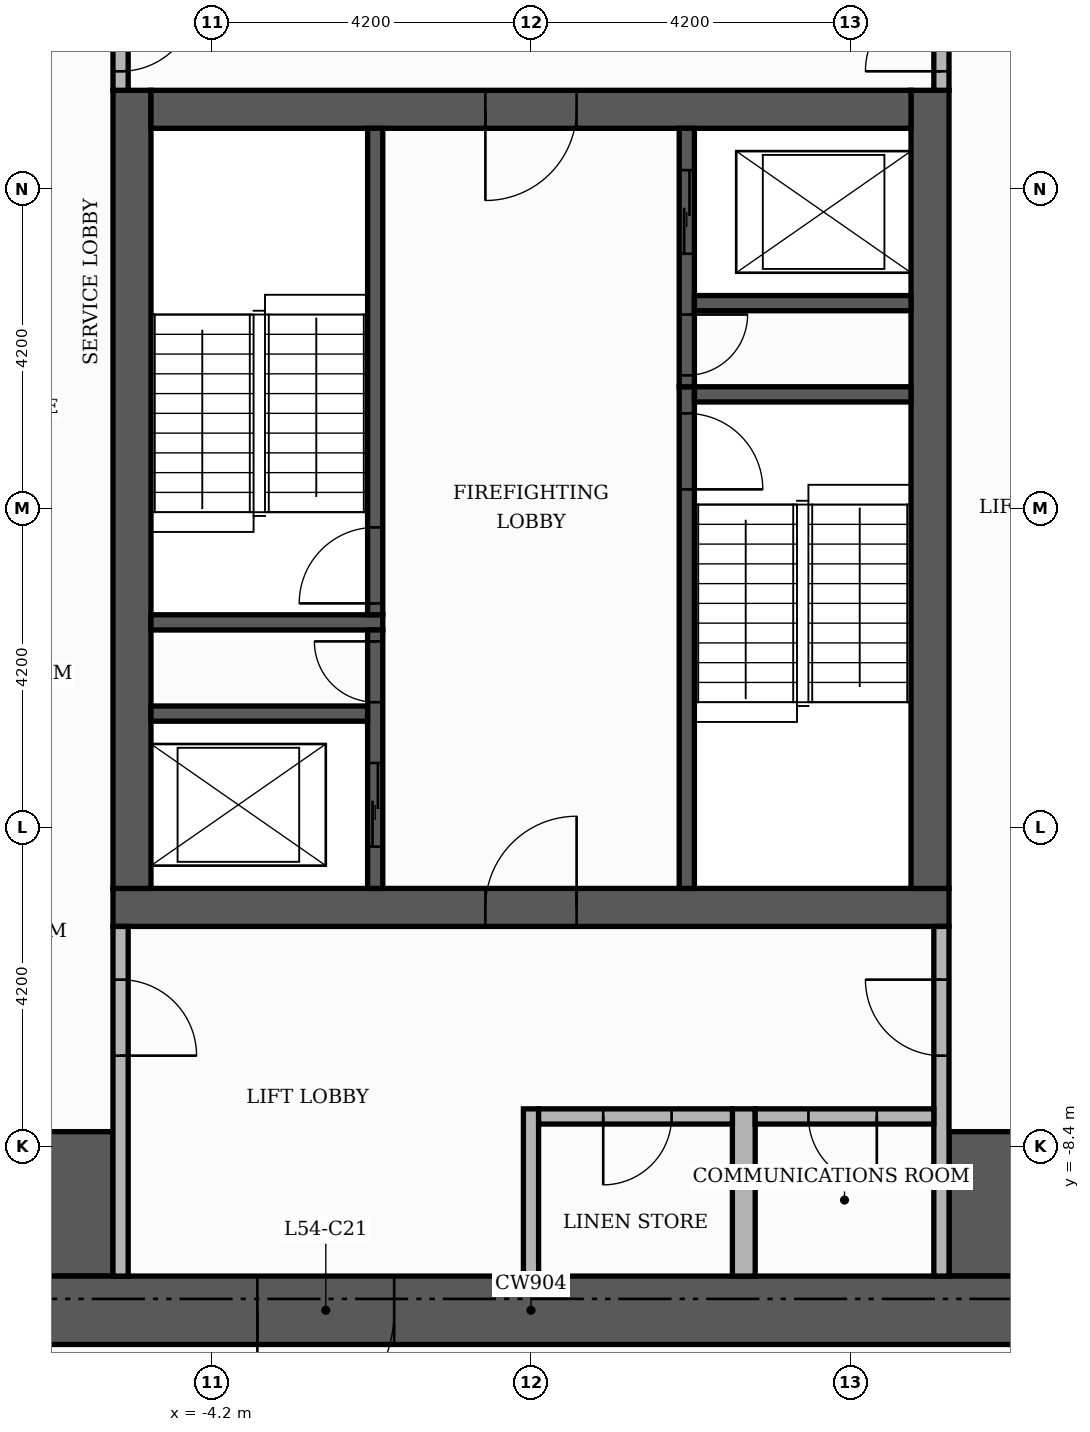
"""IFC4 building model, lengths in metres.
Left out: names, types, materials, properties, quantities, classifications, styles, units other than length and angle.
Written with IfcOpenShell. Run it as: python <this file> out.ifc"""

import sys

from ifc_helpers import new_model, si_unit, direction, frame, frame_2d, origin, place, context, subcontext, project, spatial, rectangle, extrude, element, fill, save


model = new_model("IFC4")
c1 = context("Model", 3, precision=1e-05, world=origin(), true_north=direction((0.0, 1.0)))
c2 = subcontext(c1, "Body", "Model", "MODEL_VIEW")
j1 = project(units=[si_unit("LENGTHUNIT", "METRE"), si_unit("PLANEANGLEUNIT", "RADIAN")], contexts=[c1])
p1 = place(None, origin())
s1 = spatial("IfcSite", under=j1, at=p1, CompositionType="ELEMENT")
p2 = place(p1, origin())
s2 = spatial("IfcBuilding", under=s1, at=p2, CompositionType="ELEMENT")
p3 = place(p2, frame((0.0, 0.0, 227.4)))
s3 = spatial("IfcBuildingStorey", under=s2, at=p3, CompositionType="ELEMENT", Elevation=227.4)
p4 = place(p3, frame((-5.5, -5.25, 0.0), z_axis=(0.0, 0.0, 1.0), x_axis=(1.0, 0.0, 0.0)))
e1 = element("IfcWall", 1, at=p4, inside=s3, PredefinedType="SHEAR", context=c2, shape_type="SweptSolid", body=[
    extrude(rectangle(XDim=11.0, YDim=0.5, at=frame_2d((5.5, 0.0))), origin(), (0.0, 0.0, 1.0), 3.48),
])
p5 = place(p4, frame((4.9, 0.0, 0.0)))
e2 = element("IfcOpeningElement", 2, at=p5, cuts=e1, PredefinedType="OPENING", context=c2, shape_type="SweptSolid", body=[
    extrude(rectangle(XDim=1.2, YDim=2.1, at=frame_2d((0.6, 1.05))), frame((0.0, 0.26, 0.0), z_axis=(0.0, -1.0, 0.0), x_axis=(1.0, 0.0, 0.0)), (0.0, 0.0, 1.0), 0.52),
])
for number, where, z_axis, x_axis in (
    (3, (-5.25, -5.0, 0.0), (0.0, 0.0, 1.0), (0.0, 1.0, 0.0)),
    (4, (5.25, -5.0, 0.0), (0.0, 0.0, 1.0), (0.0, 1.0, 0.0)),
):
    element("IfcWall", number, at=place(p3, frame(where, z_axis=z_axis, x_axis=x_axis)), inside=s3, PredefinedType="SHEAR", context=c2, shape_type="SweptSolid", body=[
        extrude(rectangle(XDim=10.5, YDim=0.5, at=frame_2d((5.25, 0.0))), origin(), (0.0, 0.0, 1.0), 3.48),
    ])
p6 = place(p3, frame((-5.0, 5.25, 0.0), z_axis=(0.0, 0.0, 1.0), x_axis=(1.0, 0.0, 0.0)))
e5 = element("IfcWall", 5, at=p6, inside=s3, PredefinedType="SHEAR", context=c2, shape_type="SweptSolid", body=[
    extrude(rectangle(XDim=10.0, YDim=0.5, at=frame_2d((5.0, 0.0))), origin(), (0.0, 0.0, 1.0), 3.48),
])
p7 = place(p6, frame((4.4, 0.0, 0.0)))
e6 = element("IfcOpeningElement", 6, at=p7, cuts=e5, PredefinedType="OPENING", context=c2, shape_type="SweptSolid", body=[
    extrude(rectangle(XDim=1.2, YDim=2.1, at=frame_2d((0.6, 1.05))), frame((0.0, 0.26, 0.0), z_axis=(0.0, -1.0, 0.0), x_axis=(1.0, 0.0, 0.0)), (0.0, 0.0, 1.0), 0.52),
])
for number, where, z_axis, x_axis in (
    (7, (-10.1, -9.15, 0.0), (0.0, 0.0, 1.0), (1.0, 0.0, 0.0)),
    (8, (5.5, -9.15, 0.0), (0.0, 0.0, 1.0), (1.0, 0.0, 0.0)),
):
    element("IfcWall", number, at=place(p3, frame(where, z_axis=z_axis, x_axis=x_axis)), inside=s3, PredefinedType="SHEAR", context=c2, shape_type="SweptSolid", body=[
        extrude(rectangle(XDim=4.6, YDim=1.9, at=frame_2d((2.3, 0.0))), origin(), (0.0, 0.0, 1.0), 3.48),
    ])
p8 = place(p3, frame((2.05, -5.0, 0.0), z_axis=(0.0, 0.0, 1.0), x_axis=(0.0, 1.0, 0.0)))
e9 = element("IfcWall", 9, at=p8, inside=s3, PredefinedType="SHEAR", context=c2, shape_type="SweptSolid", body=[
    extrude(rectangle(XDim=6.6, YDim=0.2, at=frame_2d((3.3, 0.0))), origin(), (0.0, 0.0, 1.0), 3.48),
])
p9 = place(p8, frame((5.25, 0.0, 0.0)))
e10 = element("IfcOpeningElement", 10, at=p9, cuts=e9, PredefinedType="OPENING", context=c2, shape_type="SweptSolid", body=[
    extrude(rectangle(XDim=1.0, YDim=2.1, at=frame_2d((0.5, 1.05))), frame((0.0, 0.11, 0.0), z_axis=(0.0, -1.0, 0.0), x_axis=(1.0, 0.0, 0.0)), (0.0, 0.0, 1.0), 0.22),
])
p10 = place(p3, frame((-5.0, -1.5, 0.0), z_axis=(0.0, 0.0, 1.0), x_axis=(1.0, 0.0, 0.0)))
e11 = element("IfcWall", 11, at=p10, inside=s3, PredefinedType="SHEAR", context=c2, shape_type="SweptSolid", body=[
    extrude(rectangle(XDim=3.05, YDim=0.2, at=frame_2d((1.525, 0.0))), origin(), (0.0, 0.0, 1.0), 3.48),
])
p11 = place(p3, frame((-2.05, -1.4, 0.0), z_axis=(0.0, 0.0, 1.0), x_axis=(0.0, 1.0, 0.0)))
e12 = element("IfcWall", 12, at=p11, inside=s3, PredefinedType="SHEAR", context=c2, shape_type="SweptSolid", body=[
    extrude(rectangle(XDim=6.4, YDim=0.2, at=frame_2d((3.2, 0.0))), origin(), (0.0, 0.0, 1.0), 3.48),
])
p12 = place(p11, frame((0.15, 0.0, 0.0)))
e13 = element("IfcOpeningElement", 13, at=p12, cuts=e12, PredefinedType="OPENING", context=c2, shape_type="SweptSolid", body=[
    extrude(rectangle(XDim=1.0, YDim=2.1, at=frame_2d((0.5, 1.05))), frame((0.0, 0.11, 0.0), z_axis=(0.0, -1.0, 0.0), x_axis=(1.0, 0.0, 0.0)), (0.0, 0.0, 1.0), 0.22),
])
p13 = place(p3, frame((2.15, 1.5, 0.0), z_axis=(0.0, 0.0, 1.0), x_axis=(1.0, 0.0, 0.0)))
e14 = element("IfcWall", 14, at=p13, inside=s3, PredefinedType="SHEAR", context=c2, shape_type="SweptSolid", body=[
    extrude(rectangle(XDim=2.85, YDim=0.2, at=frame_2d((1.425, 0.0))), origin(), (0.0, 0.0, 1.0), 3.48),
])
p14 = place(p3, frame((-2.05, -5.0, 0.0), z_axis=(0.0, 0.0, 1.0), x_axis=(0.0, 1.0, 0.0)))
e15 = element("IfcWall", 15, at=p14, inside=s3, PredefinedType="SHEAR", context=c2, shape_type="SweptSolid", body=[
    extrude(rectangle(XDim=3.4, YDim=0.2, at=frame_2d((1.7, 0.0))), origin(), (0.0, 0.0, 1.0), 3.48),
])
p15 = place(p14, frame((0.55, 0.0, 0.0)))
e16 = element("IfcOpeningElement", 16, at=p15, cuts=e15, PredefinedType="OPENING", context=c2, shape_type="SweptSolid", body=[
    extrude(rectangle(XDim=1.1, YDim=2.1, at=frame_2d((0.55, 1.05))), frame((0.0, 0.11, 0.0), z_axis=(0.0, -1.0, 0.0), x_axis=(1.0, 0.0, 0.0)), (0.0, 0.0, 1.0), 0.22),
])
p16 = place(p14, frame((2.45, 0.0, 0.0)))
e17 = element("IfcOpeningElement", 17, at=p16, cuts=e15, PredefinedType="OPENING", context=c2, shape_type="SweptSolid", body=[
    extrude(rectangle(XDim=0.8, YDim=2.1, at=frame_2d((0.4, 1.05))), frame((0.0, 0.11, 0.0), z_axis=(0.0, -1.0, 0.0), x_axis=(1.0, 0.0, 0.0)), (0.0, 0.0, 1.0), 0.22),
])
p17 = place(p3, frame((-5.0, -2.7, 0.0), z_axis=(0.0, 0.0, 1.0), x_axis=(1.0, 0.0, 0.0)))
e18 = element("IfcWall", 18, at=p17, inside=s3, PredefinedType="SHEAR", context=c2, shape_type="SweptSolid", body=[
    extrude(rectangle(XDim=2.85, YDim=0.2, at=frame_2d((1.425, 0.0))), origin(), (0.0, 0.0, 1.0), 3.48),
])
p18 = place(p3, frame((2.05, 1.6, 0.0), z_axis=(0.0, 0.0, 1.0), x_axis=(0.0, 1.0, 0.0)))
e19 = element("IfcWall", 19, at=p18, inside=s3, PredefinedType="SHEAR", context=c2, shape_type="SweptSolid", body=[
    extrude(rectangle(XDim=3.4, YDim=0.2, at=frame_2d((1.7, 0.0))), origin(), (0.0, 0.0, 1.0), 3.48),
])
p19 = place(p18, frame((1.75, 0.0, 0.0)))
e20 = element("IfcOpeningElement", 20, at=p19, cuts=e19, PredefinedType="OPENING", context=c2, shape_type="SweptSolid", body=[
    extrude(rectangle(XDim=1.1, YDim=2.1, at=frame_2d((0.55, 1.05))), frame((0.0, 0.11, 0.0), z_axis=(0.0, -1.0, 0.0), x_axis=(1.0, 0.0, 0.0)), (0.0, 0.0, 1.0), 0.22),
])
p20 = place(p18, frame((0.15, 0.0, 0.0)))
e21 = element("IfcOpeningElement", 21, at=p20, cuts=e19, PredefinedType="OPENING", context=c2, shape_type="SweptSolid", body=[
    extrude(rectangle(XDim=0.8, YDim=2.1, at=frame_2d((0.4, 1.05))), frame((0.0, 0.11, 0.0), z_axis=(0.0, -1.0, 0.0), x_axis=(1.0, 0.0, 0.0)), (0.0, 0.0, 1.0), 0.22),
])
p21 = place(p3, frame((2.15, 2.7, 0.0), z_axis=(0.0, 0.0, 1.0), x_axis=(1.0, 0.0, 0.0)))
e22 = element("IfcWall", 22, at=p21, inside=s3, PredefinedType="SHEAR", context=c2, shape_type="SweptSolid", body=[
    extrude(rectangle(XDim=2.85, YDim=0.2, at=frame_2d((1.425, 0.0))), origin(), (0.0, 0.0, 1.0), 3.48),
])
p22 = place(p3, frame((-11.0, -10.55, 0.0), z_axis=(0.0, 0.0, 1.0), x_axis=(1.0, 0.0, 0.0)))
e23 = element("IfcWall", 23, at=p22, inside=s3, PredefinedType="SHEAR", context=c2, shape_type="SweptSolid", body=[
    extrude(rectangle(XDim=22.0, YDim=0.9, at=frame_2d((11.0, 0.0))), origin(), (0.0, 0.0, 1.0), 3.48),
])
p23 = place(p22, frame((7.4, 0.0, 0.0)))
e24 = element("IfcOpeningElement", 24, at=p23, cuts=e23, PredefinedType="OPENING", context=c2, shape_type="SweptSolid", body=[
    extrude(rectangle(XDim=1.8, YDim=2.2, at=frame_2d((0.9, 1.1))), frame((0.0, 0.46, 0.0), z_axis=(0.0, -1.0, 0.0), x_axis=(1.0, 0.0, 0.0)), (0.0, 0.0, 1.0), 0.92),
])
p24 = place(p3, frame((-5.4, -10.1, 0.0), z_axis=(0.0, 0.0, 1.0), x_axis=(0.0, 1.0, 0.0)))
e25 = element("IfcWall", 25, at=p24, inside=s3, PredefinedType="PARTITIONING", context=c2, shape_type="SweptSolid", body=[
    extrude(rectangle(XDim=4.6, YDim=0.2, at=frame_2d((2.3, 0.0))), origin(), (0.0, 0.0, 1.0), 3.48),
])
p25 = place(p24, frame((2.9, 0.0, 0.0)))
e26 = element("IfcOpeningElement", 26, at=p25, cuts=e25, PredefinedType="OPENING", context=c2, shape_type="SweptSolid", body=[
    extrude(rectangle(XDim=1.0, YDim=2.1, at=frame_2d((0.5, 1.05))), frame((0.0, 0.11, 0.0), z_axis=(0.0, -1.0, 0.0), x_axis=(1.0, 0.0, 0.0)), (0.0, 0.0, 1.0), 0.22),
])
p26 = place(p3, frame((0.0, -10.1, 0.0), z_axis=(0.0, 0.0, 1.0), x_axis=(0.0, 1.0, 0.0)))
e27 = element("IfcWall", 27, at=p26, inside=s3, PredefinedType="PARTITIONING", context=c2, shape_type="SweptSolid", body=[
    extrude(rectangle(XDim=2.2, YDim=0.2, at=frame_2d((1.1, 0.0))), origin(), (0.0, 0.0, 1.0), 3.48),
])
p27 = place(p3, frame((2.8, -10.1, 0.0), z_axis=(0.0, 0.0, 1.0), x_axis=(0.0, 1.0, 0.0)))
e28 = element("IfcWall", 28, at=p27, inside=s3, PredefinedType="PARTITIONING", context=c2, shape_type="SweptSolid", body=[
    extrude(rectangle(XDim=2.2, YDim=0.3, at=frame_2d((1.1, 0.0))), origin(), (0.0, 0.0, 1.0), 3.48),
])
p28 = place(p3, frame((5.4, -10.1, 0.0), z_axis=(0.0, 0.0, 1.0), x_axis=(0.0, 1.0, 0.0)))
e29 = element("IfcWall", 29, at=p28, inside=s3, PredefinedType="PARTITIONING", context=c2, shape_type="SweptSolid", body=[
    extrude(rectangle(XDim=4.6, YDim=0.2, at=frame_2d((2.3, 0.0))), origin(), (0.0, 0.0, 1.0), 3.48),
])
p29 = place(p28, frame((2.9, 0.0, 0.0)))
e30 = element("IfcOpeningElement", 30, at=p29, cuts=e29, PredefinedType="OPENING", context=c2, shape_type="SweptSolid", body=[
    extrude(rectangle(XDim=1.0, YDim=2.1, at=frame_2d((0.5, 1.05))), frame((0.0, 0.11, 0.0), z_axis=(0.0, -1.0, 0.0), x_axis=(1.0, 0.0, 0.0)), (0.0, 0.0, 1.0), 0.22),
])
p30 = place(p3, frame((0.1, -8.0, 0.0), z_axis=(0.0, 0.0, 1.0), x_axis=(1.0, 0.0, 0.0)))
e31 = element("IfcWall", 31, at=p30, inside=s3, PredefinedType="PARTITIONING", context=c2, shape_type="SweptSolid", body=[
    extrude(rectangle(XDim=2.55, YDim=0.2, at=frame_2d((1.275, 0.0))), origin(), (0.0, 0.0, 1.0), 3.48),
])
p31 = place(p30, frame((0.85, 0.0, 0.0)))
e32 = element("IfcOpeningElement", 32, at=p31, cuts=e31, PredefinedType="OPENING", context=c2, shape_type="SweptSolid", body=[
    extrude(rectangle(XDim=0.9, YDim=2.1, at=frame_2d((0.45, 1.05))), frame((0.0, 0.11, 0.0), z_axis=(0.0, -1.0, 0.0), x_axis=(1.0, 0.0, 0.0)), (0.0, 0.0, 1.0), 0.22),
])
p32 = place(p3, frame((2.95, -8.0, 0.0), z_axis=(0.0, 0.0, 1.0), x_axis=(1.0, 0.0, 0.0)))
e33 = element("IfcWall", 33, at=p32, inside=s3, PredefinedType="PARTITIONING", context=c2, shape_type="SweptSolid", body=[
    extrude(rectangle(XDim=2.35, YDim=0.2, at=frame_2d((1.175, 0.0))), origin(), (0.0, 0.0, 1.0), 3.48),
])
p33 = place(p32, frame((0.7, 0.0, 0.0)))
e34 = element("IfcOpeningElement", 34, at=p33, cuts=e33, PredefinedType="OPENING", context=c2, shape_type="SweptSolid", body=[
    extrude(rectangle(XDim=0.9, YDim=2.1, at=frame_2d((0.45, 1.05))), frame((0.0, 0.11, 0.0), z_axis=(0.0, -1.0, 0.0), x_axis=(1.0, 0.0, 0.0)), (0.0, 0.0, 1.0), 0.22),
])
p34 = place(p3, frame((-5.4, 5.5, 0.0), z_axis=(0.0, 0.0, 1.0), x_axis=(0.0, 1.0, 0.0)))
e35 = element("IfcWall", 35, at=p34, inside=s3, PredefinedType="PARTITIONING", context=c2, shape_type="SweptSolid", body=[
    extrude(rectangle(XDim=1.55, YDim=0.2, at=frame_2d((0.775, 0.0))), origin(), (0.0, 0.0, 1.0), 3.48),
])
p35 = place(p34, frame((0.25, 0.0, 0.0)))
e36 = element("IfcOpeningElement", 36, at=p35, cuts=e35, PredefinedType="OPENING", context=c2, shape_type="SweptSolid", body=[
    extrude(rectangle(XDim=1.0, YDim=2.1, at=frame_2d((0.5, 1.05))), frame((0.0, 0.11, 0.0), z_axis=(0.0, -1.0, 0.0), x_axis=(1.0, 0.0, 0.0)), (0.0, 0.0, 1.0), 0.22),
])
p36 = place(p3, frame((5.4, 5.5, 0.0), z_axis=(0.0, 0.0, 1.0), x_axis=(0.0, 1.0, 0.0)))
e37 = element("IfcWall", 37, at=p36, inside=s3, PredefinedType="PARTITIONING", context=c2, shape_type="SweptSolid", body=[
    extrude(rectangle(XDim=4.6, YDim=0.2, at=frame_2d((2.3, 0.0))), origin(), (0.0, 0.0, 1.0), 3.48),
])
p37 = place(p36, frame((0.25, 0.0, 0.0)))
e38 = element("IfcOpeningElement", 38, at=p37, cuts=e37, PredefinedType="OPENING", context=c2, shape_type="SweptSolid", body=[
    extrude(rectangle(XDim=1.0, YDim=2.1, at=frame_2d((0.5, 1.05))), frame((0.0, 0.11, 0.0), z_axis=(0.0, -1.0, 0.0), x_axis=(1.0, 0.0, 0.0)), (0.0, 0.0, 1.0), 0.22),
])
p38 = place(p19, origin())
e39 = element("IfcDoor", 39, at=p38, inside=s3, OperationType="SLIDING_TO_LEFT", PredefinedType="DOOR", context=c2, shape_type="SweptSolid", body=[
    extrude(rectangle(XDim=1.1, YDim=2.1, at=frame_2d((0.55, 1.05))), frame((0.0, 0.025, 0.0), z_axis=(0.0, -1.0, 0.0), x_axis=(1.0, 0.0, 0.0)), (0.0, 0.0, 1.0), 0.05),
])
fill(e20, e39)
p39 = place(p15, origin())
e40 = element("IfcDoor", 40, at=p39, inside=s3, OperationType="SLIDING_TO_LEFT", PredefinedType="DOOR", context=c2, shape_type="SweptSolid", body=[
    extrude(rectangle(XDim=1.1, YDim=2.1, at=frame_2d((0.55, 1.05))), frame((0.0, 0.025, 0.0), z_axis=(0.0, -1.0, 0.0), x_axis=(1.0, 0.0, 0.0)), (0.0, 0.0, 1.0), 0.05),
])
fill(e16, e40)
p40 = place(p12, origin())
e41 = element("IfcDoor", 41, at=p40, inside=s3, OperationType="SINGLE_SWING_LEFT", PredefinedType="DOOR", context=c2, shape_type="SweptSolid", body=[
    extrude(rectangle(XDim=1.0, YDim=2.1, at=frame_2d((0.5, 1.05))), frame((0.0, 0.025, 0.0), z_axis=(0.0, -1.0, 0.0), x_axis=(1.0, 0.0, 0.0)), (0.0, 0.0, 1.0), 0.05),
])
fill(e13, e41)
p41 = place(p9, frame((1.0, 0.0, 0.0), z_axis=(0.0, 0.0, 1.0), x_axis=(-1.0, 0.0, 0.0)))
e42 = element("IfcDoor", 42, at=p41, inside=s3, OperationType="SINGLE_SWING_LEFT", PredefinedType="DOOR", context=c2, shape_type="SweptSolid", body=[
    extrude(rectangle(XDim=1.0, YDim=2.1, at=frame_2d((0.5, 1.05))), frame((0.0, 0.025, 0.0), z_axis=(0.0, -1.0, 0.0), x_axis=(1.0, 0.0, 0.0)), (0.0, 0.0, 1.0), 0.05),
])
fill(e10, e42)
p42 = place(p20, frame((0.8, 0.0, 0.0), z_axis=(0.0, 0.0, 1.0), x_axis=(-1.0, 0.0, 0.0)))
e43 = element("IfcDoor", 43, at=p42, inside=s3, OperationType="SINGLE_SWING_RIGHT", PredefinedType="DOOR", context=c2, shape_type="SweptSolid", body=[
    extrude(rectangle(XDim=0.8, YDim=2.1, at=frame_2d((0.4, 1.05))), frame((0.0, 0.025, 0.0), z_axis=(0.0, -1.0, 0.0), x_axis=(1.0, 0.0, 0.0)), (0.0, 0.0, 1.0), 0.05),
])
fill(e21, e43)
p43 = place(p16, origin())
e44 = element("IfcDoor", 44, at=p43, inside=s3, OperationType="SINGLE_SWING_RIGHT", PredefinedType="DOOR", context=c2, shape_type="SweptSolid", body=[
    extrude(rectangle(XDim=0.8, YDim=2.1, at=frame_2d((0.4, 1.05))), frame((0.0, 0.025, 0.0), z_axis=(0.0, -1.0, 0.0), x_axis=(1.0, 0.0, 0.0)), (0.0, 0.0, 1.0), 0.05),
])
fill(e17, e44)
p44 = place(p7, frame((1.2, 0.0, 0.0), z_axis=(0.0, 0.0, 1.0), x_axis=(-1.0, 0.0, 0.0)))
e45 = element("IfcDoor", 45, at=p44, inside=s3, OperationType="SINGLE_SWING_LEFT", PredefinedType="DOOR", context=c2, shape_type="SweptSolid", body=[
    extrude(rectangle(XDim=1.2, YDim=2.1, at=frame_2d((0.6, 1.05))), frame((0.0, 0.025, 0.0), z_axis=(0.0, -1.0, 0.0), x_axis=(1.0, 0.0, 0.0)), (0.0, 0.0, 1.0), 0.05),
])
fill(e6, e45)
p45 = place(p5, origin())
e46 = element("IfcDoor", 46, at=p45, inside=s3, OperationType="SINGLE_SWING_RIGHT", PredefinedType="DOOR", context=c2, shape_type="SweptSolid", body=[
    extrude(rectangle(XDim=1.2, YDim=2.1, at=frame_2d((0.6, 1.05))), frame((0.0, 0.025, 0.0), z_axis=(0.0, -1.0, 0.0), x_axis=(1.0, 0.0, 0.0)), (0.0, 0.0, 1.0), 0.05),
])
fill(e2, e46)
p46 = place(p35, frame((1.0, 0.0, 0.0), z_axis=(0.0, 0.0, 1.0), x_axis=(-1.0, 0.0, 0.0)))
e47 = element("IfcDoor", 47, at=p46, inside=s3, OperationType="SINGLE_SWING_RIGHT", PredefinedType="DOOR", context=c2, shape_type="SweptSolid", body=[
    extrude(rectangle(XDim=1.0, YDim=2.1, at=frame_2d((0.5, 1.05))), frame((0.0, 0.025, 0.0), z_axis=(0.0, -1.0, 0.0), x_axis=(1.0, 0.0, 0.0)), (0.0, 0.0, 1.0), 0.05),
])
fill(e36, e47)
p47 = place(p37, origin())
e48 = element("IfcDoor", 48, at=p47, inside=s3, OperationType="SINGLE_SWING_LEFT", PredefinedType="DOOR", context=c2, shape_type="SweptSolid", body=[
    extrude(rectangle(XDim=1.0, YDim=2.1, at=frame_2d((0.5, 1.05))), frame((0.0, 0.025, 0.0), z_axis=(0.0, -1.0, 0.0), x_axis=(1.0, 0.0, 0.0)), (0.0, 0.0, 1.0), 0.05),
])
fill(e38, e48)
p48 = place(p25, frame((1.0, 0.0, 0.0), z_axis=(0.0, 0.0, 1.0), x_axis=(-1.0, 0.0, 0.0)))
e49 = element("IfcDoor", 49, at=p48, inside=s3, OperationType="SINGLE_SWING_LEFT", PredefinedType="DOOR", context=c2, shape_type="SweptSolid", body=[
    extrude(rectangle(XDim=1.0, YDim=2.1, at=frame_2d((0.5, 1.05))), frame((0.0, 0.025, 0.0), z_axis=(0.0, -1.0, 0.0), x_axis=(1.0, 0.0, 0.0)), (0.0, 0.0, 1.0), 0.05),
])
fill(e26, e49)
p49 = place(p29, origin())
e50 = element("IfcDoor", 50, at=p49, inside=s3, OperationType="SINGLE_SWING_RIGHT", PredefinedType="DOOR", context=c2, shape_type="SweptSolid", body=[
    extrude(rectangle(XDim=1.0, YDim=2.1, at=frame_2d((0.5, 1.05))), frame((0.0, 0.025, 0.0), z_axis=(0.0, -1.0, 0.0), x_axis=(1.0, 0.0, 0.0)), (0.0, 0.0, 1.0), 0.05),
])
fill(e30, e50)
p50 = place(p23, frame((1.8, 0.0, 0.0), z_axis=(0.0, 0.0, 1.0), x_axis=(-1.0, 0.0, 0.0)))
e51 = element("IfcDoor", 51, at=p50, inside=s3, OperationType="DOUBLE_DOOR_SINGLE_SWING", PredefinedType="DOOR", context=c2, shape_type="SweptSolid", body=[
    extrude(rectangle(XDim=1.8, YDim=2.2, at=frame_2d((0.9, 1.1))), frame((0.0, 0.025, 0.0), z_axis=(0.0, -1.0, 0.0), x_axis=(1.0, 0.0, 0.0)), (0.0, 0.0, 1.0), 0.05),
])
fill(e24, e51)
p51 = place(p31, frame((0.9, 0.0, 0.0), z_axis=(0.0, 0.0, 1.0), x_axis=(-1.0, 0.0, 0.0)))
e52 = element("IfcDoor", 52, at=p51, inside=s3, OperationType="SINGLE_SWING_LEFT", PredefinedType="DOOR", context=c2, shape_type="SweptSolid", body=[
    extrude(rectangle(XDim=0.9, YDim=2.1, at=frame_2d((0.45, 1.05))), frame((0.0, 0.025, 0.0), z_axis=(0.0, -1.0, 0.0), x_axis=(1.0, 0.0, 0.0)), (0.0, 0.0, 1.0), 0.05),
])
fill(e32, e52)
p52 = place(p33, frame((0.9, 0.0, 0.0), z_axis=(0.0, 0.0, 1.0), x_axis=(-1.0, 0.0, 0.0)))
e53 = element("IfcDoor", 53, at=p52, inside=s3, OperationType="SINGLE_SWING_RIGHT", PredefinedType="DOOR", context=c2, shape_type="SweptSolid", body=[
    extrude(rectangle(XDim=0.9, YDim=2.1, at=frame_2d((0.45, 1.05))), frame((0.0, 0.025, 0.0), z_axis=(0.0, -1.0, 0.0), x_axis=(1.0, 0.0, 0.0)), (0.0, 0.0, 1.0), 0.05),
])
fill(e34, e53)
save(model, sys.argv[1])
